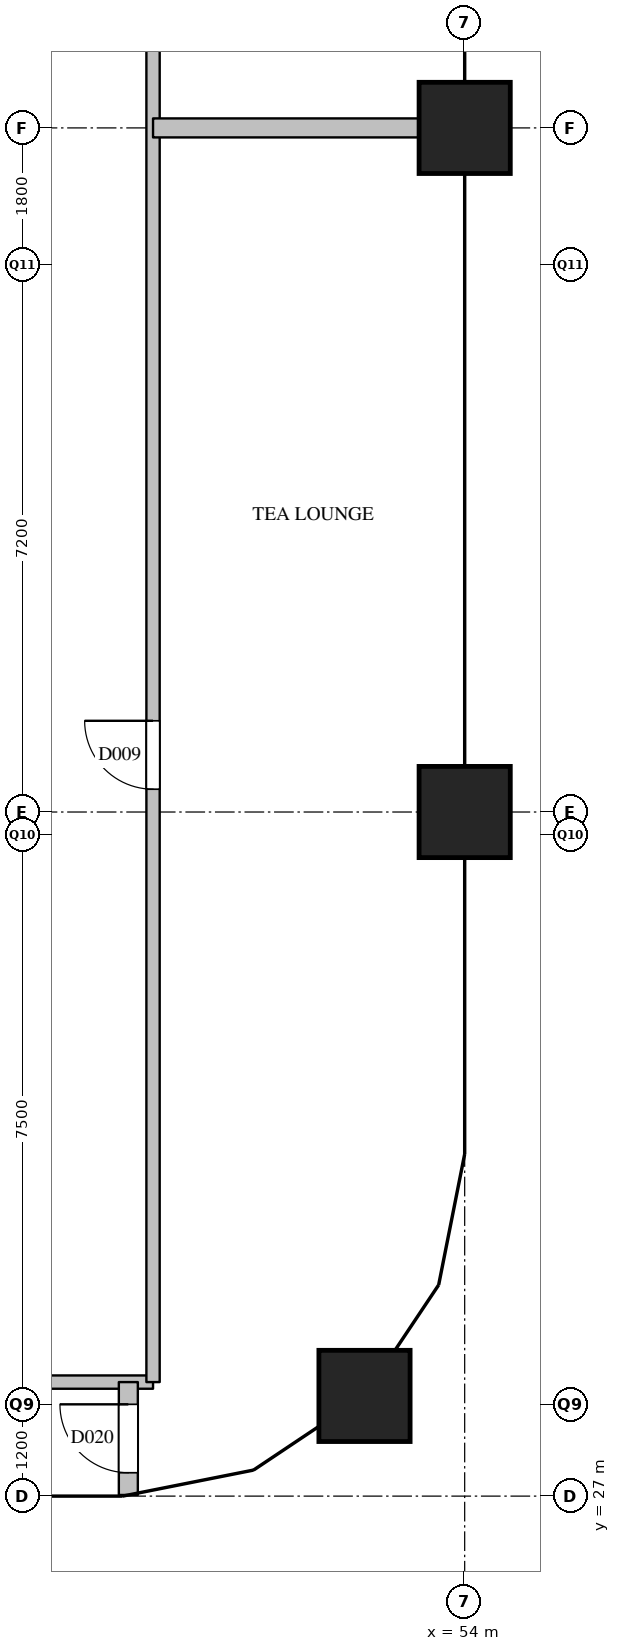
"""IFC4 building model, lengths in metres.
Left out: names, types, materials, properties, quantities, classifications, styles, units other than length and angle.
Written with IfcOpenShell. Run it as: python <this file> out.ifc"""

import sys

from ifc_helpers import new_model, si_unit, direction, frame, frame_2d, origin, origin_2d, place, context, subcontext, project, spatial, rectangle, extrude, element, fill, save


model = new_model("IFC4")
c1 = context("Model", 3, precision=1e-05, world=origin(), true_north=direction((0.0, 1.0)))
c2 = subcontext(c1, "Body", "Model", "MODEL_VIEW")
j1 = project(units=[si_unit("LENGTHUNIT", "METRE"), si_unit("PLANEANGLEUNIT", "RADIAN")], contexts=[c1])
p1 = place(None, origin())
s1 = spatial("IfcSite", under=j1, at=p1, CompositionType="ELEMENT")
p2 = place(p1, origin())
s2 = spatial("IfcBuilding", under=s1, at=p2, CompositionType="ELEMENT")
p3 = place(p2, frame((0.0, 0.0, 254.0)))
s3 = spatial("IfcBuildingStorey", under=s2, at=p3, CompositionType="ELEMENT", Elevation=254.0)
for number, where, z_axis, x_axis in (
    (1, (52.682, 28.318, 0.0), (0.0, 0.0, 1.0), (1.0, 0.0, 0.0)),
    (2, (54.0, 36.0, 0.0), (0.0, 0.0, 1.0), (1.0, 0.0, 0.0)),
    (3, (54.0, 45.0, 0.0), (0.0, 0.0, 1.0), (1.0, 0.0, 0.0)),
):
    element("IfcColumn", number, at=place(p3, frame(where, z_axis=z_axis, x_axis=x_axis)), inside=s3, PredefinedType="COLUMN", context=c2, shape_type="SweptSolid", body=[
        extrude(rectangle(XDim=1.2, YDim=1.2, at=origin_2d()), origin(), (0.0, 0.0, 1.0), 3.9),
    ])
p4 = place(p3, frame((48.4, 28.5, 0.0), z_axis=(0.0, 0.0, 1.0), x_axis=(1.0, 0.0, 0.0)))
e4 = element("IfcWall", 4, at=p4, inside=s3, PredefinedType="PARTITIONING", context=c2, shape_type="SweptSolid", body=[
    extrude(rectangle(XDim=1.5, YDim=0.175, at=frame_2d((0.75, 0.0))), origin(), (0.0, 0.0, 1.0), 3.6),
])
p5 = place(p3, frame((49.9, 28.5, 0.0), z_axis=(0.0, 0.0, 1.0), x_axis=(0.0, 1.0, 0.0)))
e5 = element("IfcWall", 5, at=p5, inside=s3, PredefinedType="PARTITIONING", context=c2, shape_type="SweptSolid", body=[
    extrude(rectangle(XDim=23.0, YDim=0.175, at=frame_2d((11.5, 0.0))), origin(), (0.0, 0.0, 1.0), 3.6),
])
p6 = place(p5, frame((7.8, 0.0, 0.0)))
e6 = element("IfcOpeningElement", 6, at=p6, cuts=e5, PredefinedType="OPENING", context=c2, shape_type="SweptSolid", body=[
    extrude(rectangle(XDim=0.9, YDim=2.1, at=frame_2d((0.45, 1.05))), frame((0.0, 0.097, 0.0), z_axis=(0.0, -1.0, 0.0), x_axis=(1.0, 0.0, 0.0)), (0.0, 0.0, 1.0), 0.195),
])
p7 = place(p5, frame((19.3, 0.0, 0.0)))
e7 = element("IfcOpeningElement", 7, at=p7, cuts=e5, PredefinedType="OPENING", context=c2, shape_type="SweptSolid", body=[
    extrude(rectangle(XDim=0.9, YDim=2.1, at=frame_2d((0.45, 1.05))), frame((0.0, 0.097, 0.0), z_axis=(0.0, -1.0, 0.0), x_axis=(1.0, 0.0, 0.0)), (0.0, 0.0, 1.0), 0.195),
])
p8 = place(p3, frame((49.9, 45.0, 0.0), z_axis=(0.0, 0.0, 1.0), x_axis=(1.0, 0.0, 0.0)))
e8 = element("IfcWall", 8, at=p8, inside=s3, PredefinedType="PARTITIONING", context=c2, shape_type="SweptSolid", body=[
    extrude(rectangle(XDim=4.1, YDim=0.25, at=frame_2d((2.05, 0.0))), origin(), (0.0, 0.0, 1.0), 3.6),
])
p9 = place(p3, frame((49.575, 27.015, 0.0), z_axis=(0.0, 0.0, 1.0), x_axis=(0.0, 1.0, 0.0)))
e9 = element("IfcWall", 9, at=p9, inside=s3, PredefinedType="PARTITIONING", context=c2, shape_type="SweptSolid", body=[
    extrude(rectangle(XDim=1.485, YDim=0.25, at=frame_2d((0.743, 0.0))), origin(), (0.0, 0.0, 1.0), 2.6),
])
p10 = place(p9, frame((0.292, 0.0, 0.0)))
e10 = element("IfcOpeningElement", 10, at=p10, cuts=e9, PredefinedType="OPENING", context=c2, shape_type="SweptSolid", body=[
    extrude(rectangle(XDim=0.9, YDim=2.1, at=frame_2d((0.45, 1.05))), frame((0.0, 0.135, 0.0), z_axis=(0.0, -1.0, 0.0), x_axis=(1.0, 0.0, 0.0)), (0.0, 0.0, 1.0), 0.27),
])
p11 = place(p6, origin())
e11 = element("IfcDoor", 11, at=p11, inside=s3, OperationType="SINGLE_SWING_RIGHT", PredefinedType="DOOR", context=c2, shape_type="SweptSolid", body=[
    extrude(rectangle(XDim=0.9, YDim=2.1, at=frame_2d((0.45, 1.05))), frame((0.0, 0.025, 0.0), z_axis=(0.0, -1.0, 0.0), x_axis=(1.0, 0.0, 0.0)), (0.0, 0.0, 1.0), 0.05),
])
fill(e6, e11)
p12 = place(p10, origin())
e12 = element("IfcDoor", 12, at=p12, inside=s3, OperationType="SINGLE_SWING_RIGHT", PredefinedType="DOOR", context=c2, shape_type="SweptSolid", body=[
    extrude(rectangle(XDim=0.9, YDim=2.1, at=frame_2d((0.45, 1.05))), frame((0.0, 0.025, 0.0), z_axis=(0.0, -1.0, 0.0), x_axis=(1.0, 0.0, 0.0)), (0.0, 0.0, 1.0), 0.05),
])
fill(e10, e12)
save(model, sys.argv[1])
